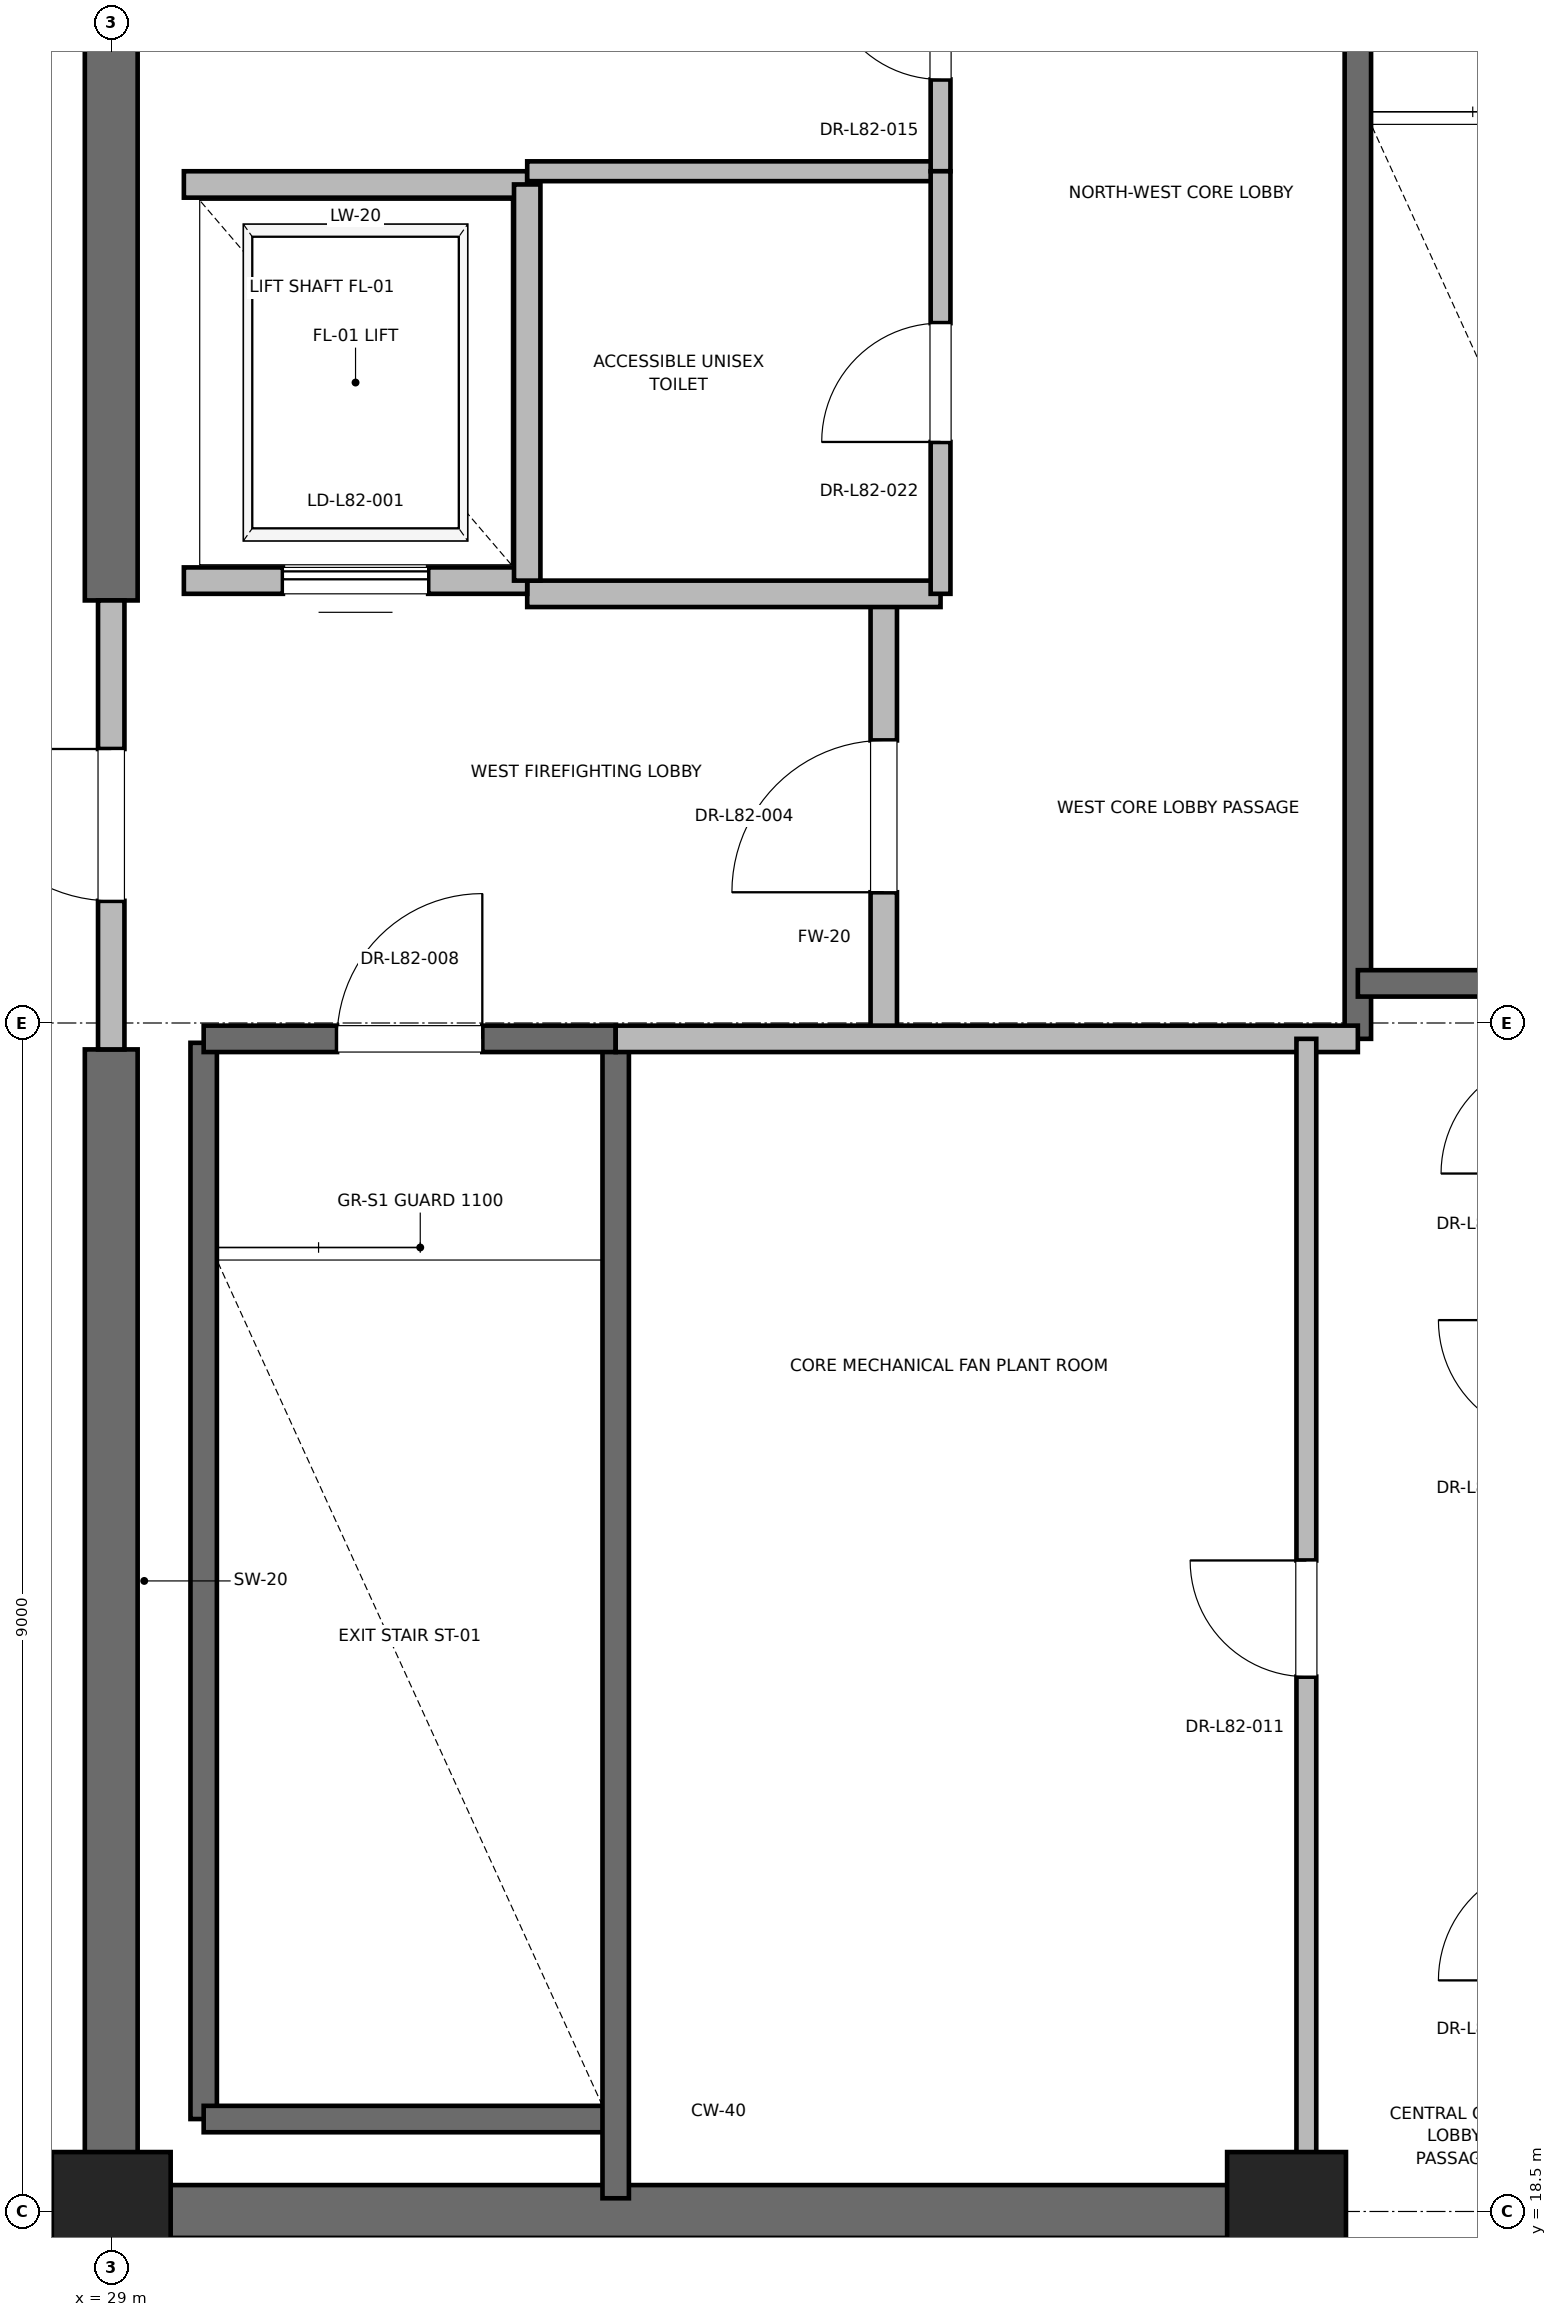
"""IFC4 building model, lengths in metres.
Left out: names, types, materials, properties, quantities, classifications, styles, units other than length and angle.
Written with IfcOpenShell. Run it as: python <this file> out.ifc"""

import sys

from ifc_helpers import new_model, si_unit, direction, frame, frame_2d, origin, origin_2d, place, context, subcontext, project, spatial, rectangle, extrude, element, fill, save


model = new_model("IFC4")
c1 = context("Model", 3, precision=1e-05, world=origin(), true_north=direction((0.0, 1.0)))
c2 = subcontext(c1, "Body", "Model", "MODEL_VIEW")
j1 = project(units=[si_unit("LENGTHUNIT", "METRE"), si_unit("PLANEANGLEUNIT", "RADIAN")], contexts=[c1])
p1 = place(None, origin())
s1 = spatial("IfcSite", under=j1, at=p1, CompositionType="ELEMENT")
p2 = place(p1, origin())
s2 = spatial("IfcBuilding", under=s1, at=p2, CompositionType="ELEMENT")
p3 = place(p2, frame((0.0, 0.0, 354.3)))
s3 = spatial("IfcBuildingStorey", under=s2, at=p3, CompositionType="ELEMENT", Elevation=354.3)
for number, where, z_axis, x_axis in (
    (1, (29.0, 18.5, 0.0), (0.0, 0.0, 1.0), (1.0, 0.0, 0.0)),
    (2, (37.9, 18.5, 0.0), (0.0, 0.0, 1.0), (1.0, 0.0, 0.0)),
):
    element("IfcColumn", number, at=place(p3, frame(where, z_axis=z_axis, x_axis=x_axis)), inside=s3, PredefinedType="PILASTER", context=c2, shape_type="SweptSolid", body=[
        extrude(rectangle(XDim=0.9, YDim=0.9, at=origin_2d()), origin(), (0.0, 0.0, 1.0), 5.5),
    ])
p4 = place(p3, frame((29.0, 18.5, 0.0), z_axis=(0.0, 0.0, 1.0), x_axis=(1.0, 0.0, 0.0)))
e3 = element("IfcWall", 3, at=p4, inside=s3, PredefinedType="SHEAR", context=c2, shape_type="SweptSolid", body=[
    extrude(rectangle(XDim=9.2, YDim=0.4, at=frame_2d((4.6, 0.0))), origin(), (0.0, 0.0, 1.0), 5.24),
])
p5 = place(p3, frame((29.0, 18.5, 0.0), z_axis=(0.0, 0.0, 1.0), x_axis=(0.0, 1.0, 0.0)))
e4 = element("IfcWall", 4, at=p5, inside=s3, PredefinedType="SHEAR", context=c2, shape_type="SweptSolid", body=[
    extrude(rectangle(XDim=8.8, YDim=0.4, at=frame_2d((4.4, 0.0))), origin(), (0.0, 0.0, 1.0), 5.24),
])
p6 = place(p3, frame((29.0, 30.7, 0.0), z_axis=(0.0, 0.0, 1.0), x_axis=(0.0, 1.0, 0.0)))
e5 = element("IfcWall", 5, at=p6, inside=s3, PredefinedType="SHEAR", context=c2, shape_type="SweptSolid", body=[
    extrude(rectangle(XDim=5.8, YDim=0.4, at=frame_2d((2.9, 0.0))), origin(), (0.0, 0.0, 1.0), 5.24),
])
p7 = place(p3, frame((29.7, 19.2, 0.0), z_axis=(0.0, 0.0, 1.0), x_axis=(0.0, 1.0, 0.0)))
e6 = element("IfcWall", 6, at=p7, inside=s3, PredefinedType="SOLIDWALL", context=c2, shape_type="SweptSolid", body=[
    extrude(rectangle(XDim=8.15, YDim=0.2, at=frame_2d((4.075, 0.0))), origin(), (0.0, 0.0, 1.0), 5.24),
])
p8 = place(p3, frame((29.7, 19.2, 0.0), z_axis=(0.0, 0.0, 1.0), x_axis=(1.0, 0.0, 0.0)))
e7 = element("IfcWall", 7, at=p8, inside=s3, PredefinedType="SOLIDWALL", context=c2, shape_type="SweptSolid", body=[
    extrude(rectangle(XDim=3.12, YDim=0.2, at=frame_2d((1.56, 0.0))), origin(), (0.0, 0.0, 1.0), 5.24),
])
p9 = place(p3, frame((32.82, 18.6, 0.0), z_axis=(0.0, 0.0, 1.0), x_axis=(0.0, 1.0, 0.0)))
e8 = element("IfcWall", 8, at=p9, inside=s3, PredefinedType="SOLIDWALL", context=c2, shape_type="SweptSolid", body=[
    extrude(rectangle(XDim=8.78, YDim=0.2, at=frame_2d((4.39, 0.0))), origin(), (0.0, 0.0, 1.0), 5.24),
])
p10 = place(p3, frame((29.7, 27.38, 0.0), z_axis=(0.0, 0.0, 1.0), x_axis=(1.0, 0.0, 0.0)))
e9 = element("IfcWall", 9, at=p10, inside=s3, PredefinedType="SOLIDWALL", context=c2, shape_type="SweptSolid", body=[
    extrude(rectangle(XDim=3.12, YDim=0.2, at=frame_2d((1.56, 0.0))), origin(), (0.0, 0.0, 1.0), 5.24),
])
p11 = place(p10, frame((1.01, 0.0, 0.0)))
e10 = element("IfcOpeningElement", 10, at=p11, cuts=e9, PredefinedType="OPENING", context=c2, shape_type="SweptSolid", body=[
    extrude(rectangle(XDim=1.1, YDim=2.15, at=frame_2d((0.55, 1.075))), frame((0.0, 0.1, 0.0), z_axis=(0.0, -1.0, 0.0), x_axis=(1.0, 0.0, 0.0)), (0.0, 0.0, 1.0), 0.2),
])
p12 = place(p3, frame((38.44, 27.38, 0.0), z_axis=(0.0, 0.0, 1.0), x_axis=(0.0, 1.0, 0.0)))
e11 = element("IfcWall", 11, at=p12, inside=s3, PredefinedType="SOLIDWALL", context=c2, shape_type="SweptSolid", body=[
    extrude(rectangle(XDim=8.87, YDim=0.2, at=frame_2d((4.435, 0.0))), origin(), (0.0, 0.0, 1.0), 5.24),
])
p13 = place(p3, frame((38.44, 27.8, 0.0), z_axis=(0.0, 0.0, 1.0), x_axis=(1.0, 0.0, 0.0)))
e12 = element("IfcWall", 12, at=p13, inside=s3, PredefinedType="SOLIDWALL", context=c2, shape_type="SweptSolid", body=[
    extrude(rectangle(XDim=3.32, YDim=0.2, at=frame_2d((1.66, 0.0))), origin(), (0.0, 0.0, 1.0), 5.24),
])
p14 = place(p3, frame((34.85, 27.38, 0.0), z_axis=(0.0, 0.0, 1.0), x_axis=(0.0, 1.0, 0.0)))
e13 = element("IfcWall", 13, at=p14, inside=s3, PredefinedType="PARTITIONING", context=c2, shape_type="SweptSolid", body=[
    extrude(rectangle(XDim=3.37, YDim=0.2, at=frame_2d((1.685, 0.0))), origin(), (0.0, 0.0, 1.0), 5.24),
])
p15 = place(p14, frame((1.11, 0.0, 0.0)))
e14 = element("IfcOpeningElement", 14, at=p15, cuts=e13, PredefinedType="OPENING", context=c2, shape_type="SweptSolid", body=[
    extrude(rectangle(XDim=1.15, YDim=2.2, at=frame_2d((0.575, 1.1))), frame((0.0, 0.1, 0.0), z_axis=(0.0, -1.0, 0.0), x_axis=(1.0, 0.0, 0.0)), (0.0, 0.0, 1.0), 0.2),
])
p16 = place(p3, frame((29.0, 27.3, 0.0), z_axis=(0.0, 0.0, 1.0), x_axis=(0.0, 1.0, 0.0)))
e15 = element("IfcWall", 15, at=p16, inside=s3, PredefinedType="PARTITIONING", context=c2, shape_type="SweptSolid", body=[
    extrude(rectangle(XDim=3.4, YDim=0.2, at=frame_2d((1.7, 0.0))), origin(), (0.0, 0.0, 1.0), 4.32),
])
p17 = place(p16, frame((1.125, 0.0, 0.0)))
e16 = element("IfcOpeningElement", 16, at=p17, cuts=e15, PredefinedType="OPENING", context=c2, shape_type="SweptSolid", body=[
    extrude(rectangle(XDim=1.15, YDim=2.2, at=frame_2d((0.575, 1.1))), frame((0.0, 0.1, 0.0), z_axis=(0.0, -1.0, 0.0), x_axis=(1.0, 0.0, 0.0)), (0.0, 0.0, 1.0), 0.2),
])
p18 = place(p3, frame((32.82, 27.38, 0.0), z_axis=(0.0, 0.0, 1.0), x_axis=(1.0, 0.0, 0.0)))
e17 = element("IfcWall", 17, at=p18, inside=s3, PredefinedType="PARTITIONING", context=c2, shape_type="SweptSolid", body=[
    extrude(rectangle(XDim=5.62, YDim=0.2, at=frame_2d((2.81, 0.0))), origin(), (0.0, 0.0, 1.0), 5.24),
])
p19 = place(p3, frame((32.15, 30.75, 0.0), z_axis=(0.0, 0.0, 1.0), x_axis=(1.0, 0.0, 0.0)))
e18 = element("IfcWall", 18, at=p19, inside=s3, PredefinedType="PARTITIONING", context=c2, shape_type="SweptSolid", body=[
    extrude(rectangle(XDim=3.13, YDim=0.2, at=frame_2d((1.565, 0.0))), origin(), (0.0, 0.0, 1.0), 5.24),
])
p20 = place(p3, frame((29.55, 30.85, 0.0), z_axis=(0.0, 0.0, 1.0), x_axis=(1.0, 0.0, 0.0)))
e19 = element("IfcWall", 19, at=p20, inside=s3, PredefinedType="SOLIDWALL", context=c2, shape_type="SweptSolid", body=[
    extrude(rectangle(XDim=2.6, YDim=0.2, at=frame_2d((1.3, 0.0))), origin(), (0.0, 0.0, 1.0), 4.32),
])
p21 = place(p20, frame((0.75, 0.0, 0.0)))
e20 = element("IfcOpeningElement", 20, at=p21, cuts=e19, PredefinedType="OPENING", context=c2, shape_type="SweptSolid", body=[
    extrude(rectangle(XDim=1.1, YDim=2.2, at=frame_2d((0.55, 1.1))), frame((0.0, 0.1, 0.0), z_axis=(0.0, -1.0, 0.0), x_axis=(1.0, 0.0, 0.0)), (0.0, 0.0, 1.0), 0.2),
])
p22 = place(p3, frame((32.15, 33.85, 0.0), z_axis=(0.0, 0.0, 1.0), x_axis=(-1.0, 0.0, 0.0)))
e21 = element("IfcWall", 21, at=p22, inside=s3, PredefinedType="SOLIDWALL", context=c2, shape_type="SweptSolid", body=[
    extrude(rectangle(XDim=2.6, YDim=0.2, at=frame_2d((1.3, 0.0))), origin(), (0.0, 0.0, 1.0), 5.24),
])
p23 = place(p3, frame((32.15, 30.85, 0.0), z_axis=(0.0, 0.0, 1.0), x_axis=(0.0, 1.0, 0.0)))
e22 = element("IfcWall", 22, at=p23, inside=s3, PredefinedType="SOLIDWALL", context=c2, shape_type="SweptSolid", body=[
    extrude(rectangle(XDim=3.0, YDim=0.2, at=frame_2d((1.5, 0.0))), origin(), (0.0, 0.0, 1.0), 5.24),
])
p24 = place(p3, frame((32.15, 33.95, 0.0), z_axis=(0.0, 0.0, 1.0), x_axis=(1.0, 0.0, 0.0)))
e23 = element("IfcWall", 23, at=p24, inside=s3, PredefinedType="PARTITIONING", context=c2, shape_type="SweptSolid", body=[
    extrude(rectangle(XDim=3.13, YDim=0.15, at=frame_2d((1.565, 0.0))), origin(), (0.0, 0.0, 1.0), 2.85),
])
p25 = place(p3, frame((35.28, 33.95, 0.0), z_axis=(0.0, 0.0, 1.0), x_axis=(0.0, 1.0, 0.0)))
e24 = element("IfcWall", 24, at=p25, inside=s3, PredefinedType="PARTITIONING", context=c2, shape_type="SweptSolid", body=[
    extrude(rectangle(XDim=2.27, YDim=0.15, at=frame_2d((1.135, 0.0))), origin(), (0.0, 0.0, 1.0), 2.85),
])
p26 = place(p25, frame((0.695, 0.0, 0.0)))
e25 = element("IfcOpeningElement", 25, at=p26, cuts=e24, PredefinedType="OPENING", context=c2, shape_type="SweptSolid", body=[
    extrude(rectangle(XDim=0.88, YDim=2.1, at=frame_2d((0.44, 1.05))), frame((0.0, 0.075, 0.0), z_axis=(0.0, -1.0, 0.0), x_axis=(1.0, 0.0, 0.0)), (0.0, 0.0, 1.0), 0.15),
])
p27 = place(p3, frame((35.28, 30.75, 0.0), z_axis=(0.0, 0.0, 1.0), x_axis=(0.0, 1.0, 0.0)))
e26 = element("IfcWall", 26, at=p27, inside=s3, PredefinedType="PARTITIONING", context=c2, shape_type="SweptSolid", body=[
    extrude(rectangle(XDim=3.2, YDim=0.15, at=frame_2d((1.6, 0.0))), origin(), (0.0, 0.0, 1.0), 2.85),
])
p28 = place(p27, frame((1.15, 0.0, 0.0)))
e27 = element("IfcOpeningElement", 27, at=p28, cuts=e26, PredefinedType="OPENING", context=c2, shape_type="SweptSolid", body=[
    extrude(rectangle(XDim=0.9, YDim=2.1, at=frame_2d((0.45, 1.05))), frame((0.0, 0.075, 0.0), z_axis=(0.0, -1.0, 0.0), x_axis=(1.0, 0.0, 0.0)), (0.0, 0.0, 1.0), 0.15),
])
p29 = place(p3, frame((38.05, 18.6, 0.0), z_axis=(0.0, 0.0, 1.0), x_axis=(0.0, 1.0, 0.0)))
e28 = element("IfcWall", 28, at=p29, inside=s3, PredefinedType="PARTITIONING", context=c2, shape_type="SweptSolid", body=[
    extrude(rectangle(XDim=8.78, YDim=0.15, at=frame_2d((4.39, 0.0))), origin(), (0.0, 0.0, 1.0), 2.85),
])
p30 = place(p29, frame((3.95, 0.0, 0.0)))
e29 = element("IfcOpeningElement", 29, at=p30, cuts=e28, PredefinedType="OPENING", context=c2, shape_type="SweptSolid", body=[
    extrude(rectangle(XDim=0.88, YDim=2.1, at=frame_2d((0.44, 1.05))), frame((0.0, 0.075, 0.0), z_axis=(0.0, -1.0, 0.0), x_axis=(1.0, 0.0, 0.0)), (0.0, 0.0, 1.0), 0.15),
])
p31 = place(p11, origin())
e30 = element("IfcDoor", 30, at=p31, inside=s3, OperationType="SINGLE_SWING_RIGHT", PredefinedType="DOOR", context=c2, shape_type="SweptSolid", body=[
    extrude(rectangle(XDim=1.1, YDim=2.15, at=frame_2d((0.55, 1.075))), frame((0.0, 0.025, 0.0), z_axis=(0.0, -1.0, 0.0), x_axis=(1.0, 0.0, 0.0)), (0.0, 0.0, 1.0), 0.05),
])
fill(e10, e30)
p32 = place(p15, origin())
e31 = element("IfcDoor", 31, at=p32, inside=s3, OperationType="SINGLE_SWING_LEFT", PredefinedType="DOOR", context=c2, shape_type="SweptSolid", body=[
    extrude(rectangle(XDim=1.15, YDim=2.2, at=frame_2d((0.575, 1.1))), frame((0.0, 0.025, 0.0), z_axis=(0.0, -1.0, 0.0), x_axis=(1.0, 0.0, 0.0)), (0.0, 0.0, 1.0), 0.05),
])
fill(e14, e31)
p33 = place(p17, origin())
e32 = element("IfcDoor", 32, at=p33, inside=s3, OperationType="SINGLE_SWING_RIGHT", PredefinedType="DOOR", context=c2, shape_type="SweptSolid", body=[
    extrude(rectangle(XDim=1.15, YDim=2.2, at=frame_2d((0.575, 1.1))), frame((0.0, 0.025, 0.0), z_axis=(0.0, -1.0, 0.0), x_axis=(1.0, 0.0, 0.0)), (0.0, 0.0, 1.0), 0.05),
])
fill(e16, e32)
p34 = place(p21, origin())
e33 = element("IfcDoor", 33, at=p34, inside=s3, OperationType="SLIDING_TO_RIGHT", PredefinedType="DOOR", context=c2, shape_type="SweptSolid", body=[
    extrude(rectangle(XDim=1.1, YDim=2.2, at=frame_2d((0.55, 1.1))), frame((0.0, 0.025, 0.0), z_axis=(0.0, -1.0, 0.0), x_axis=(1.0, 0.0, 0.0)), (0.0, 0.0, 1.0), 0.05),
])
fill(e20, e33)
p35 = place(p26, origin())
e34 = element("IfcDoor", 34, at=p35, inside=s3, OperationType="SINGLE_SWING_RIGHT", PredefinedType="DOOR", context=c2, shape_type="SweptSolid", body=[
    extrude(rectangle(XDim=0.88, YDim=2.1, at=frame_2d((0.44, 1.05))), frame((0.0, 0.025, 0.0), z_axis=(0.0, -1.0, 0.0), x_axis=(1.0, 0.0, 0.0)), (0.0, 0.0, 1.0), 0.05),
])
fill(e25, e34)
p36 = place(p28, origin())
e35 = element("IfcDoor", 35, at=p36, inside=s3, OperationType="SINGLE_SWING_LEFT", PredefinedType="DOOR", context=c2, shape_type="SweptSolid", body=[
    extrude(rectangle(XDim=0.9, YDim=2.1, at=frame_2d((0.45, 1.05))), frame((0.0, 0.025, 0.0), z_axis=(0.0, -1.0, 0.0), x_axis=(1.0, 0.0, 0.0)), (0.0, 0.0, 1.0), 0.05),
])
fill(e27, e35)
p37 = place(p30, origin())
e36 = element("IfcDoor", 36, at=p37, inside=s3, OperationType="SINGLE_SWING_RIGHT", PredefinedType="DOOR", context=c2, shape_type="SweptSolid", body=[
    extrude(rectangle(XDim=0.88, YDim=2.1, at=frame_2d((0.44, 1.05))), frame((0.0, 0.025, 0.0), z_axis=(0.0, -1.0, 0.0), x_axis=(1.0, 0.0, 0.0)), (0.0, 0.0, 1.0), 0.05),
])
fill(e29, e36)
save(model, sys.argv[1])
